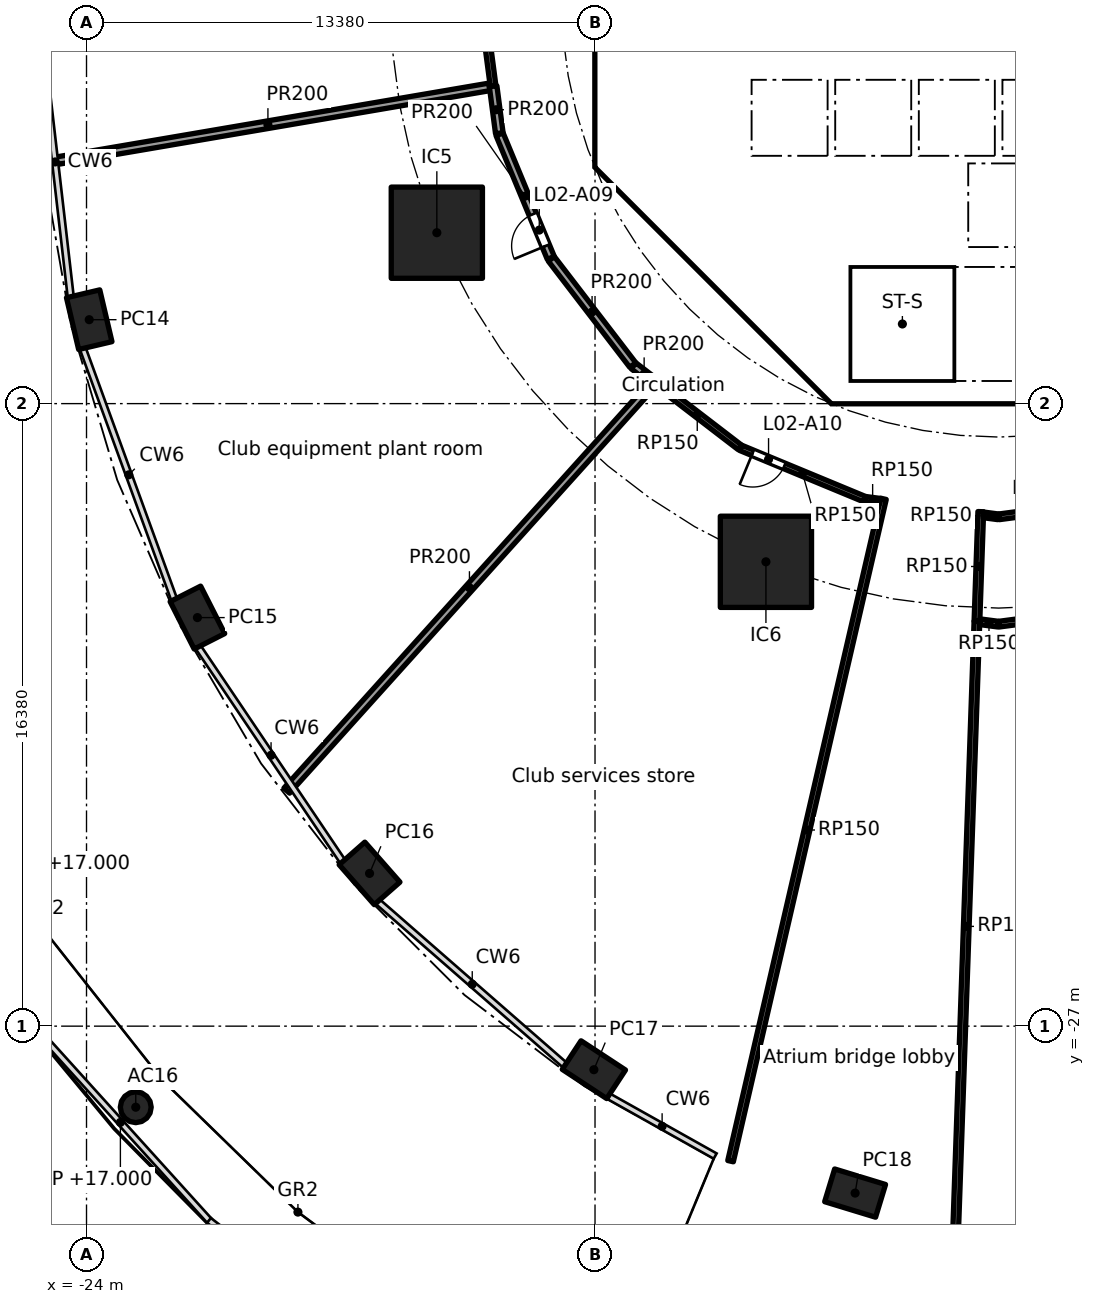
"""IFC4 building model, lengths in metres.
Left out: names, types, materials, properties, quantities, classifications, styles, units other than length and angle.
Written with IfcOpenShell. Run it as: python <this file> out.ifc"""

import sys

from ifc_helpers import new_model, si_unit, direction, frame, frame_2d, origin, origin_2d, place, context, subcontext, project, spatial, polyline, rectangle, hollow_rectangle, hollow_circle, outline, extrude, element, fill, save


model = new_model("IFC4")
c1 = context("Model", 3, precision=1e-05, world=origin(), true_north=direction((0.0, 1.0)))
c2 = subcontext(c1, "Body", "Model", "MODEL_VIEW")
j1 = project(units=[si_unit("LENGTHUNIT", "METRE"), si_unit("PLANEANGLEUNIT", "RADIAN")], contexts=[c1])
p1 = place(None, origin())
s1 = spatial("IfcSite", under=j1, at=p1, CompositionType="ELEMENT")
p2 = place(p1, origin())
s2 = spatial("IfcBuilding", under=s1, at=p2, CompositionType="ELEMENT")
p3 = place(p2, frame((0.0, 0.0, 12.0)))
s3 = spatial("IfcBuildingStorey", under=s2, at=p3, CompositionType="ELEMENT", Elevation=12.0)
for number, where, z_axis, x_axis in (
    (1, (-23.929, -8.412, 0.0), (0.0, 0.0, 1.0), (0.229, -0.973, 0.0)),
    (2, (-21.082, -16.25, 0.0), (0.0, 0.0, 1.0), (0.452, -0.892, 0.0)),
    (3, (-16.552, -22.981, 0.0), (0.0, 0.0, 1.0), (0.66, -0.751, 0.0)),
    (4, (-10.65, -28.146, 0.0), (0.0, 0.0, 1.0), (0.836, -0.549, 0.0)),
    (5, (-3.776, -31.393, 0.0), (0.0, 0.0, 1.0), (0.957, -0.292, 0.0)),
):
    element("IfcColumn", number, at=place(p3, frame(where, z_axis=z_axis, x_axis=x_axis)), inside=s3, PredefinedType="COLUMN", context=c2, shape_type="SweptSolid", body=[
        extrude(hollow_rectangle(XDim=1.4, YDim=0.9, WallThickness=0.05, at=origin_2d()), origin(), (0.0, 0.0, 1.0), 5.0),
    ])
for number, where, z_axis, x_axis in (
    (6, (-14.782, -6.123, 0.0), (0.0, 0.0, 1.0), (1.0, 0.0, 0.0)),
    (7, (-6.123, -14.782, 0.0), (0.0, 0.0, 1.0), (1.0, 0.0, 0.0)),
):
    element("IfcColumn", number, at=place(p3, frame(where, z_axis=z_axis, x_axis=x_axis)), inside=s3, PredefinedType="COLUMN", context=c2, shape_type="SweptSolid", body=[
        extrude(rectangle(XDim=2.4, YDim=2.4, at=origin_2d()), origin(), (0.0, 0.0, 1.0), 5.0),
    ])
p4 = place(p3, frame((-22.704, -29.133, 0.0), z_axis=(0.0, 0.0, 1.0), x_axis=(1.0, 0.0, 0.0)))
e8 = element("IfcColumn", 8, at=p4, inside=s3, PredefinedType="COLUMN", context=c2, shape_type="SweptSolid", body=[
    extrude(hollow_circle(Radius=0.406, WallThickness=0.025, at=origin_2d()), origin(), (0.0, 0.0, 1.0), 5.0),
])
p5 = place(p3, frame((-10.325, 3.801, 0.0), z_axis=(0.0, 0.0, 1.0), x_axis=(0.0, -1.0, 0.0)))
e9 = element("IfcWall", 9, at=p5, inside=s3, PredefinedType="SHEAR", context=c2, shape_type="SweptSolid", body=[
    extrude(rectangle(XDim=7.602, YDim=0.6, at=frame_2d((3.801, 0.0))), origin(), (0.0, 0.0, 1.0), 4.7),
])
p6 = place(p5, frame((0.651, 0.0, 0.0)))
e10 = element("IfcOpeningElement", 10, at=p6, cuts=e9, PredefinedType="OPENING", context=c2, shape_type="SweptSolid", body=[
    extrude(rectangle(XDim=1.5, YDim=2.1, at=frame_2d((0.75, 1.05))), frame((0.0, 0.31, 0.0), z_axis=(0.0, -1.0, 0.0), x_axis=(1.0, 0.0, 0.0)), (0.0, 0.0, 1.0), 0.62),
])
p7 = place(p5, frame((5.451, 0.0, 0.0)))
e11 = element("IfcOpeningElement", 11, at=p7, cuts=e9, PredefinedType="OPENING", context=c2, shape_type="SweptSolid", body=[
    extrude(rectangle(XDim=1.5, YDim=2.1, at=frame_2d((0.75, 1.05))), frame((0.0, 0.31, 0.0), z_axis=(0.0, -1.0, 0.0), x_axis=(1.0, 0.0, 0.0)), (0.0, 0.0, 1.0), 0.62),
])
p8 = place(p3, frame((-9.988, -4.613, 0.0), z_axis=(0.0, 0.0, 1.0), x_axis=(0.707106781187, -0.707106781187, 0.0)))
e12 = element("IfcWall", 12, at=p8, inside=s3, PredefinedType="SHEAR", context=c2, shape_type="SweptSolid", body=[
    extrude(rectangle(XDim=7.602, YDim=0.6, at=frame_2d((3.801, 0.0))), origin(), (0.0, 0.0, 1.0), 4.7),
])
p9 = place(p8, frame((6.151, 0.0, 0.0)))
e13 = element("IfcOpeningElement", 13, at=p9, cuts=e12, PredefinedType="OPENING", context=c2, shape_type="SweptSolid", body=[
    extrude(rectangle(XDim=1.1, YDim=2.1, at=frame_2d((0.55, 1.05))), frame((0.0, 0.31, 0.0), z_axis=(0.0, -1.0, 0.0), x_axis=(1.0, 0.0, 0.0)), (0.0, 0.0, 1.0), 0.62),
])
p10 = place(p3, frame((-5.8, -8.227, 0.0), z_axis=(0.0, 0.0, 1.0), x_axis=(0.0, 1.0, 0.0)))
e14 = element("IfcWall", 14, at=p10, inside=s3, PredefinedType="PARTITIONING", context=c2, shape_type="SweptSolid", body=[
    extrude(rectangle(XDim=3.927, YDim=0.15, at=frame_2d((1.963, 0.0))), origin(), (0.0, 0.0, 1.0), 4.7),
])
p11 = place(p10, frame((1.476, 0.0, 0.0)))
e15 = element("IfcOpeningElement", 15, at=p11, cuts=e14, PredefinedType="OPENING", context=c2, shape_type="SweptSolid", body=[
    extrude(rectangle(XDim=0.9, YDim=2.1, at=frame_2d((0.45, 1.05))), frame((0.0, 0.085, 0.0), z_axis=(0.0, -1.0, 0.0), x_axis=(1.0, 0.0, 0.0)), (0.0, 0.0, 1.0), 0.17),
])
p12 = place(p3, frame((-4.0, -6.5, 0.0), z_axis=(0.0, 0.0, 1.0), x_axis=(0.0, 1.0, 0.0)))
e16 = element("IfcWall", 16, at=p12, inside=s3, PredefinedType="SOLIDWALL", context=c2, shape_type="SweptSolid", body=[
    extrude(rectangle(XDim=2.2, YDim=0.2, at=frame_2d((1.1, 0.0))), origin(), (0.0, 0.0, 1.0), 4.7),
])
p13 = place(p12, frame((0.65, 0.0, 0.0)))
e17 = element("IfcOpeningElement", 17, at=p13, cuts=e16, PredefinedType="OPENING", context=c2, shape_type="SweptSolid", body=[
    extrude(rectangle(XDim=0.9, YDim=2.1, at=frame_2d((0.45, 1.05))), frame((0.0, 0.11, 0.0), z_axis=(0.0, -1.0, 0.0), x_axis=(1.0, 0.0, 0.0)), (0.0, 0.0, 1.0), 0.22),
])
p14 = place(p3, frame((-6.7, -2.0, 0.0), z_axis=(0.0, 0.0, 1.0), x_axis=(1.0, 0.0, 0.0)))
e18 = element("IfcWall", 18, at=p14, inside=s3, PredefinedType="SOLIDWALL", context=c2, shape_type="SweptSolid", body=[
    extrude(rectangle(XDim=13.4, YDim=0.2, at=frame_2d((6.7, 0.0))), origin(), (0.0, 0.0, 1.0), 4.7),
])
p15 = place(p14, frame((0.65, 0.0, 0.0)))
e19 = element("IfcOpeningElement", 19, at=p15, cuts=e18, PredefinedType="OPENING", context=c2, shape_type="SweptSolid", body=[
    extrude(rectangle(XDim=1.1, YDim=2.1, at=frame_2d((0.55, 1.05))), frame((0.0, 0.11, 0.0), z_axis=(0.0, -1.0, 0.0), x_axis=(1.0, 0.0, 0.0)), (0.0, 0.0, 1.0), 0.22),
])
p16 = place(p14, frame((2.85, 0.0, 0.0)))
e20 = element("IfcOpeningElement", 20, at=p16, cuts=e18, PredefinedType="OPENING", context=c2, shape_type="SweptSolid", body=[
    extrude(rectangle(XDim=1.1, YDim=2.1, at=frame_2d((0.55, 1.05))), frame((0.0, 0.11, 0.0), z_axis=(0.0, -1.0, 0.0), x_axis=(1.0, 0.0, 0.0)), (0.0, 0.0, 1.0), 0.22),
])
p17 = place(p3, origin())
e21 = element("IfcWall", 21, at=p17, inside=s3, PredefinedType="SHEAR", context=c2, shape_type="SweptSolid", body=[
    extrude(outline(polyline([(-10.625, -3.801), (-10.025, -3.801), (-10.025, -4.152), (-9.776, -4.401), (-10.2, -4.825), (-10.625, -4.401), (-10.625, -3.801)])), origin(), (0.0, 0.0, 1.0), 4.7),
])
p18 = place(p3, origin())
e22 = element("IfcWall", 22, at=p18, inside=s3, PredefinedType="SHEAR", context=c2, shape_type="SweptSolid", body=[
    extrude(outline(polyline([(-4.152, -10.025), (4.152, -10.025), (4.401, -9.776), (4.825, -10.2), (4.401, -10.625), (-4.401, -10.625), (-4.825, -10.2), (-4.401, -9.776), (-4.152, -10.025)])), origin(), (0.0, 0.0, 1.0), 4.7),
])
p19 = place(p3, frame((-0.9, -6.5, 0.0), z_axis=(0.0, 0.0, 1.0), x_axis=(0.0, 1.0, 0.0)))
e23 = element("IfcWall", 23, at=p19, inside=s3, PredefinedType="SOLIDWALL", context=c2, shape_type="SweptSolid", body=[
    extrude(rectangle(XDim=2.2, YDim=0.2, at=frame_2d((1.1, 0.0))), origin(), (0.0, 0.0, 1.0), 4.7),
])
p20 = place(p3, origin())
e24 = element("IfcWall", 24, at=p20, inside=s3, PredefinedType="SOLIDWALL", context=c2, shape_type="SweptSolid", body=[
    extrude(outline(polyline([(-6.7, -2.1), (-6.5, -2.1), (-6.5, -4.1), (-4.5, -4.1), (-4.5, -2.1), (-4.3, -2.1), (-4.3, -4.1), (-2.3, -4.1), (-2.3, -2.1), (-2.1, -2.1), (-2.1, -4.1), (-0.1, -4.1), (-0.1, -2.1), (0.1, -2.1), (0.1, -4.1), (2.1, -4.1), (2.1, -2.1), (2.3, -2.1), (2.3, -4.1), (4.3, -4.1), (4.3, -2.1), (4.5, -2.1), (4.5, -4.1), (6.5, -4.1), (6.5, -2.1), (6.7, -2.1), (6.7, -4.3), (-6.7, -4.3), (-6.7, -2.1)])), origin(), (0.0, 0.0, 1.0), 4.7),
])
p21 = place(p3, frame((-10.025, -4.0, 0.0), z_axis=(0.0, 0.0, 1.0), x_axis=(1.0, 0.0, 0.0)))
e25 = element("IfcWall", 25, at=p21, inside=s3, PredefinedType="PARTITIONING", context=c2, shape_type="SweptSolid", body=[
    extrude(rectangle(XDim=3.325, YDim=0.2, at=frame_2d((1.662, 0.0))), origin(), (0.0, 0.0, 1.0), 4.7),
])
p22 = place(p3, origin())
e26 = element("IfcWall", 26, at=p22, inside=s3, PredefinedType="SOLIDWALL", context=c2, shape_type="SweptSolid", body=[
    extrude(outline(polyline([(-3.9, -10.025), (-4.1, -10.025), (-4.1, -7.025), (-3.9, -7.025), (-3.9, -10.025)])), origin(), (0.0, 0.0, 1.0), 4.7),
])
p23 = place(p3, origin())
e27 = element("IfcWall", 27, at=p23, inside=s3, PredefinedType="SOLIDWALL", context=c2, shape_type="SweptSolid", body=[
    extrude(outline(polyline([(4.1, -7.025), (-4.1, -7.025), (-4.1, -6.5), (4.1, -6.5), (4.1, -7.025)])), origin(), (0.0, 0.0, 1.0), 4.7),
])
p24 = place(p3, frame((-13.301, -2.27, 0.0), z_axis=(0.0, 0.0, 1.0), x_axis=(-0.130457285505, 0.991453930679, 0.0)))
e28 = element("IfcWall", 28, at=p24, inside=s3, PredefinedType="PARTITIONING", context=c2, shape_type="SweptSolid", body=[
    extrude(rectangle(XDim=2.278, YDim=0.15, at=frame_2d((1.139, 0.0))), origin(), (0.0, 0.0, 1.0), 4.7),
])
p25 = place(p3, frame((-7.053, -30.552, 0.0), z_axis=(0.0, 0.0, 1.0), x_axis=(0.224943248141, 0.974371866956, 0.0)))
e29 = element("IfcWall", 29, at=p25, inside=s3, PredefinedType="PARTITIONING", context=c2, shape_type="SweptSolid", body=[
    extrude(rectangle(XDim=17.885, YDim=0.15, at=frame_2d((8.943, 0.0))), origin(), (0.0, 0.0, 1.0), 4.7),
])
p26 = place(p3, frame((-6.809, -11.771, 0.0), z_axis=(0.0, 0.0, 1.0), x_axis=(-0.793365630445, 0.608745411834, 0.0)))
e30 = element("IfcWall", 30, at=p26, inside=s3, PredefinedType="PARTITIONING", context=c2, shape_type="SweptSolid", body=[
    extrude(rectangle(XDim=2.825, YDim=0.15, at=frame_2d((1.412, 0.0))), origin(), (0.0, 0.0, 1.0), 4.7),
])
p27 = place(p3, frame((-3.531, -13.132, 0.0), z_axis=(0.0, 0.0, 1.0), x_axis=(-0.923881838111, 0.382677866108, 0.0)))
e31 = element("IfcWall", 31, at=p27, inside=s3, PredefinedType="PARTITIONING", context=c2, shape_type="SweptSolid", body=[
    extrude(rectangle(XDim=3.527, YDim=0.15, at=frame_2d((1.763, 0.0))), origin(), (0.0, 0.0, 1.0), 4.7),
])
p28 = place(p27, frame((2.281, 0.0, 0.0)))
e32 = element("IfcOpeningElement", 32, at=p28, cuts=e31, PredefinedType="OPENING", context=c2, shape_type="SweptSolid", body=[
    extrude(rectangle(XDim=0.9, YDim=2.1, at=frame_2d((0.45, 1.05))), frame((0.0, 0.085, 0.0), z_axis=(0.0, -1.0, 0.0), x_axis=(1.0, 0.0, 0.0)), (0.0, 0.0, 1.0), 0.17),
])
p29 = place(p3, frame((-3.122, -13.189, 0.0), z_axis=(0.0, 0.0, 1.0), x_axis=(-0.991467089631, 0.130357240609, 0.0)))
e33 = element("IfcWall", 33, at=p29, inside=s3, PredefinedType="PARTITIONING", context=c2, shape_type="SweptSolid", body=[
    extrude(rectangle(XDim=0.39, YDim=0.15, at=frame_2d((0.195, 0.0))), origin(), (0.0, 0.0, 1.0), 4.7),
])
p30 = place(p3, frame((-0.571, -16.349, 0.0), z_axis=(0.0, 0.0, 1.0), x_axis=(-0.034915122528, -0.999390281231, 0.0)))
e34 = element("IfcWall", 34, at=p30, inside=s3, PredefinedType="PARTITIONING", context=c2, shape_type="SweptSolid", body=[
    extrude(rectangle(XDim=16.062, YDim=0.15, at=frame_2d((8.031, 0.0))), origin(), (0.0, 0.0, 1.0), 4.7),
])
p31 = place(p3, frame((-0.47, -13.462, 0.0), z_axis=(0.0, 0.0, 1.0), x_axis=(-0.034907670303, -0.999390541557, 0.0)))
e35 = element("IfcWall", 35, at=p31, inside=s3, PredefinedType="PARTITIONING", context=c2, shape_type="SweptSolid", body=[
    extrude(rectangle(XDim=2.888, YDim=0.15, at=frame_2d((1.444, 0.0))), origin(), (0.0, 0.0, 1.0), 4.7),
])
p32 = place(p3, frame((-0.012, -16.423, 0.0), z_axis=(0.0, 0.0, 1.0), x_axis=(-0.991457697021, 0.130428658731, 0.0)))
e36 = element("IfcWall", 36, at=p32, inside=s3, PredefinedType="PARTITIONING", context=c2, shape_type="SweptSolid", body=[
    extrude(rectangle(XDim=0.489, YDim=0.15, at=frame_2d((0.244, 0.0))), origin(), (0.0, 0.0, 1.0), 4.7),
])
p33 = place(p3, frame((-0.012, -13.598, 0.0), z_axis=(0.0, 0.0, 1.0), x_axis=(-0.991467089631, 0.130357240609, 0.0)))
e37 = element("IfcWall", 37, at=p33, inside=s3, PredefinedType="PARTITIONING", context=c2, shape_type="SweptSolid", body=[
    extrude(rectangle(XDim=0.39, YDim=0.15, at=frame_2d((0.195, 0.0))), origin(), (0.0, 0.0, 1.0), 4.7),
])
p34 = place(p3, frame((2.812, -13.23, 0.0), z_axis=(0.0, 0.0, 1.0), x_axis=(-0.991445467051, -0.130521591565, 0.0)))
e38 = element("IfcWall", 38, at=p34, inside=s3, PredefinedType="PARTITIONING", context=c2, shape_type="SweptSolid", body=[
    extrude(rectangle(XDim=2.824, YDim=0.15, at=frame_2d((1.412, 0.0))), origin(), (0.0, 0.0, 1.0), 4.7),
])
p35 = place(p34, frame((0.968, 0.0, 0.0)))
e39 = element("IfcOpeningElement", 39, at=p35, cuts=e38, PredefinedType="OPENING", context=c2, shape_type="SweptSolid", body=[
    extrude(rectangle(XDim=0.9, YDim=2.1, at=frame_2d((0.45, 1.05))), frame((0.0, 0.085, 0.0), z_axis=(0.0, -1.0, 0.0), x_axis=(1.0, 0.0, 0.0)), (0.0, 0.0, 1.0), 0.17),
])
p36 = place(p3, frame((3.321, -15.987, 0.0), z_axis=(0.0, 0.0, 1.0), x_axis=(-0.991441844339, -0.130549106827, 0.0)))
e40 = element("IfcWall", 40, at=p36, inside=s3, PredefinedType="PARTITIONING", context=c2, shape_type="SweptSolid", body=[
    extrude(rectangle(XDim=3.338, YDim=0.15, at=frame_2d((1.669, 0.0))), origin(), (0.0, 0.0, 1.0), 4.7),
])
p37 = place(p3, frame((-18.731, -20.803, 0.0), z_axis=(0.0, 0.0, 1.0), x_axis=(0.669127133422, 0.743147952509, 0.0)))
e41 = element("IfcWall", 41, at=p37, inside=s3, PredefinedType="PARTITIONING", context=c2, shape_type="SweptSolid", body=[
    extrude(rectangle(XDim=14.367, YDim=0.2, at=frame_2d((7.184, 0.0))), origin(), (0.0, 0.0, 1.0), 4.7),
])
p38 = place(p3, frame((-13.4, -2.287, 0.0), z_axis=(0.0, 0.0, 1.0), x_axis=(-0.985752547827, -0.168202004903, 0.0)))
e42 = element("IfcWall", 42, at=p38, inside=s3, PredefinedType="PARTITIONING", context=c2, shape_type="SweptSolid", body=[
    extrude(rectangle(XDim=11.822, YDim=0.2, at=frame_2d((5.911, 0.0))), origin(), (0.0, 0.0, 1.0), 4.7),
])
p39 = place(p3, frame((-13.139, -3.505, 0.0), z_axis=(0.0, 0.0, 1.0), x_axis=(-0.130520415919, 0.991445621821, 0.0)))
e43 = element("IfcWall", 43, at=p39, inside=s3, PredefinedType="PARTITIONING", context=c2, shape_type="SweptSolid", body=[
    extrude(rectangle(XDim=1.246, YDim=0.2, at=frame_2d((0.623, 0.0))), origin(), (0.0, 0.0, 1.0), 4.7),
])
p40 = place(p3, frame((-11.784, -6.786, 0.0), z_axis=(0.0, 0.0, 1.0), x_axis=(-0.382723413813, 0.92386297064, 0.0)))
e44 = element("IfcWall", 44, at=p40, inside=s3, PredefinedType="PARTITIONING", context=c2, shape_type="SweptSolid", body=[
    extrude(rectangle(XDim=3.52, YDim=0.2, at=frame_2d((1.76, 0.0))), origin(), (0.0, 0.0, 1.0), 4.7),
])
p41 = place(p40, frame((0.342, 0.0, 0.0)))
e45 = element("IfcOpeningElement", 45, at=p41, cuts=e44, PredefinedType="OPENING", context=c2, shape_type="SweptSolid", body=[
    extrude(rectangle(XDim=0.9, YDim=2.1, at=frame_2d((0.45, 1.05))), frame((0.0, 0.11, 0.0), z_axis=(0.0, -1.0, 0.0), x_axis=(1.0, 0.0, 0.0)), (0.0, 0.0, 1.0), 0.22),
])
p42 = place(p3, frame((-9.626, -9.605, 0.0), z_axis=(0.0, 0.0, 1.0), x_axis=(-0.608697977542, 0.793402024283, 0.0)))
e46 = element("IfcWall", 46, at=p42, inside=s3, PredefinedType="PARTITIONING", context=c2, shape_type="SweptSolid", body=[
    extrude(rectangle(XDim=3.52, YDim=0.2, at=frame_2d((1.76, 0.0))), origin(), (0.0, 0.0, 1.0), 4.7),
])
p43 = place(p3, frame((-9.05, -10.051, 0.0), z_axis=(0.0, 0.0, 1.0), x_axis=(-0.793454504248, 0.608629566887, 0.0)))
e47 = element("IfcWall", 47, at=p43, inside=s3, PredefinedType="PARTITIONING", context=c2, shape_type="SweptSolid", body=[
    extrude(rectangle(XDim=0.699, YDim=0.2, at=frame_2d((0.349, 0.0))), origin(), (0.0, 0.0, 1.0), 4.7),
])
p44 = place(p15, origin())
e48 = element("IfcDoor", 48, at=p44, inside=s3, OperationType="DOUBLE_DOOR_SLIDING", PredefinedType="DOOR", context=c2, shape_type="SweptSolid", body=[
    extrude(rectangle(XDim=1.1, YDim=2.1, at=frame_2d((0.55, 1.05))), frame((0.0, 0.025, 0.0), z_axis=(0.0, -1.0, 0.0), x_axis=(1.0, 0.0, 0.0)), (0.0, 0.0, 1.0), 0.05),
])
fill(e19, e48)
p45 = place(p16, origin())
e49 = element("IfcDoor", 49, at=p45, inside=s3, OperationType="DOUBLE_DOOR_SLIDING", PredefinedType="DOOR", context=c2, shape_type="SweptSolid", body=[
    extrude(rectangle(XDim=1.1, YDim=2.1, at=frame_2d((0.55, 1.05))), frame((0.0, 0.025, 0.0), z_axis=(0.0, -1.0, 0.0), x_axis=(1.0, 0.0, 0.0)), (0.0, 0.0, 1.0), 0.05),
])
fill(e20, e49)
p46 = place(p11, origin())
e50 = element("IfcDoor", 50, at=p46, inside=s3, OperationType="SINGLE_SWING_LEFT", PredefinedType="DOOR", context=c2, shape_type="SweptSolid", body=[
    extrude(rectangle(XDim=0.9, YDim=2.1, at=frame_2d((0.45, 1.05))), frame((0.0, 0.025, 0.0), z_axis=(0.0, -1.0, 0.0), x_axis=(1.0, 0.0, 0.0)), (0.0, 0.0, 1.0), 0.05),
])
fill(e15, e50)
p47 = place(p13, frame((0.9, 0.0, 0.0), x_axis=(-1.0, 0.0, 0.0)))
e51 = element("IfcDoor", 51, at=p47, inside=s3, OperationType="SINGLE_SWING_LEFT", PredefinedType="DOOR", context=c2, shape_type="SweptSolid", body=[
    extrude(rectangle(XDim=0.9, YDim=2.1, at=frame_2d((0.45, 1.05))), frame((0.0, 0.025, 0.0), z_axis=(0.0, -1.0, 0.0), x_axis=(1.0, 0.0, 0.0)), (0.0, 0.0, 1.0), 0.05),
])
fill(e17, e51)
p48 = place(p7, origin())
e52 = element("IfcDoor", 52, at=p48, inside=s3, OperationType="DOUBLE_DOOR_SINGLE_SWING", PredefinedType="DOOR", context=c2, shape_type="SweptSolid", body=[
    extrude(rectangle(XDim=1.5, YDim=2.1, at=frame_2d((0.75, 1.05))), frame((0.0, 0.025, 0.0), z_axis=(0.0, -1.0, 0.0), x_axis=(1.0, 0.0, 0.0)), (0.0, 0.0, 1.0), 0.05),
])
fill(e11, e52)
p49 = place(p9, origin())
e53 = element("IfcDoor", 53, at=p49, inside=s3, OperationType="SINGLE_SWING_RIGHT", PredefinedType="DOOR", context=c2, shape_type="SweptSolid", body=[
    extrude(rectangle(XDim=1.1, YDim=2.1, at=frame_2d((0.55, 1.05))), frame((0.0, 0.025, 0.0), z_axis=(0.0, -1.0, 0.0), x_axis=(1.0, 0.0, 0.0)), (0.0, 0.0, 1.0), 0.05),
])
fill(e13, e53)
p50 = place(p41, origin())
e54 = element("IfcDoor", 54, at=p50, inside=s3, OperationType="SINGLE_SWING_LEFT", PredefinedType="DOOR", context=c2, shape_type="SweptSolid", body=[
    extrude(rectangle(XDim=0.9, YDim=2.1, at=frame_2d((0.45, 1.05))), frame((0.0, 0.025, 0.0), z_axis=(0.0, -1.0, 0.0), x_axis=(1.0, 0.0, 0.0)), (0.0, 0.0, 1.0), 0.05),
])
fill(e45, e54)
p51 = place(p28, origin())
e55 = element("IfcDoor", 55, at=p51, inside=s3, OperationType="SINGLE_SWING_RIGHT", PredefinedType="DOOR", context=c2, shape_type="SweptSolid", body=[
    extrude(rectangle(XDim=0.9, YDim=2.1, at=frame_2d((0.45, 1.05))), frame((0.0, 0.025, 0.0), z_axis=(0.0, -1.0, 0.0), x_axis=(1.0, 0.0, 0.0)), (0.0, 0.0, 1.0), 0.05),
])
fill(e32, e55)
save(model, sys.argv[1])
